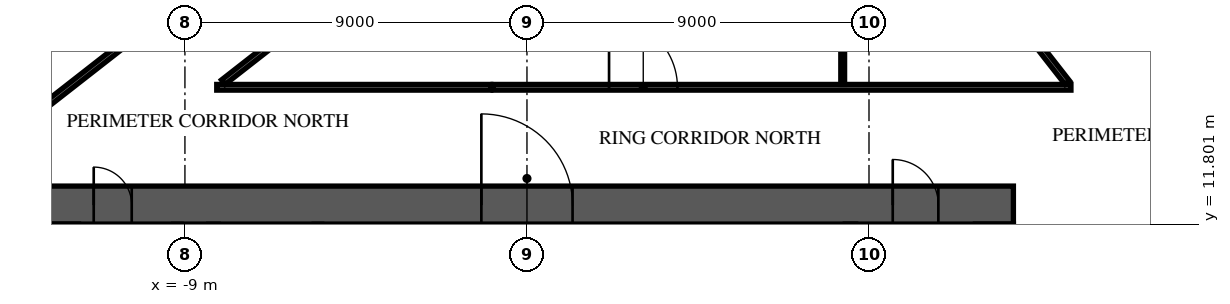
"""IFC4 building model, lengths in metres.
Left out: names, types, materials, properties, quantities, classifications, styles, units other than length and angle.
Written with IfcOpenShell. Run it as: python <this file> out.ifc"""

import sys

from ifc_helpers import new_model, si_unit, direction, frame, frame_2d, origin, place, context, subcontext, project, spatial, rectangle, extrude, element, fill, save


model = new_model("IFC4")
c1 = context("Model", 3, precision=1e-05, world=origin(), true_north=direction((0.0, 1.0)))
c2 = subcontext(c1, "Body", "Model", "MODEL_VIEW")
j1 = project(units=[si_unit("LENGTHUNIT", "METRE"), si_unit("PLANEANGLEUNIT", "RADIAN")], contexts=[c1])
p1 = place(None, origin())
s1 = spatial("IfcSite", under=j1, at=p1, CompositionType="ELEMENT")
p2 = place(p1, origin())
s2 = spatial("IfcBuilding", under=s1, at=p2, CompositionType="ELEMENT")
p3 = place(p2, frame((0.0, 0.0, 175.7)))
s3 = spatial("IfcBuildingStorey", under=s2, at=p3, CompositionType="ELEMENT", Elevation=175.7)
p4 = place(p3, frame((-12.8, 12.3, 0.0), z_axis=(0.0, 0.0, 1.0), x_axis=(1.0, 0.0, 0.0)))
e1 = element("IfcWall", 1, at=p4, inside=s3, PredefinedType="SHEAR", context=c2, shape_type="SweptSolid", body=[
    extrude(rectangle(XDim=25.6, YDim=1.0, at=frame_2d((12.8, 0.0))), origin(), (0.0, 0.0, 1.0), 3.6),
])
p5 = place(p4, frame((11.6, 0.0, 0.0)))
e2 = element("IfcOpeningElement", 2, at=p5, cuts=e1, PredefinedType="OPENING", context=c2, shape_type="SweptSolid", body=[
    extrude(rectangle(XDim=2.4, YDim=2.4, at=frame_2d((1.2, 1.2))), frame((0.0, 0.51, 0.0), z_axis=(0.0, -1.0, 0.0), x_axis=(1.0, 0.0, 0.0)), (0.0, 0.0, 1.0), 1.02),
])
p6 = place(p4, frame((22.425, 0.0, 0.0)))
e3 = element("IfcOpeningElement", 3, at=p6, cuts=e1, PredefinedType="OPENING", context=c2, shape_type="SweptSolid", body=[
    extrude(rectangle(XDim=1.2, YDim=2.1, at=frame_2d((0.6, 1.05))), frame((0.0, 0.51, 0.0), z_axis=(0.0, -1.0, 0.0), x_axis=(1.0, 0.0, 0.0)), (0.0, 0.0, 1.0), 1.02),
])
p7 = place(p4, frame((1.4, 0.0, 0.0)))
e4 = element("IfcOpeningElement", 4, at=p7, cuts=e1, PredefinedType="OPENING", context=c2, shape_type="SweptSolid", body=[
    extrude(rectangle(XDim=1.0, YDim=2.1, at=frame_2d((0.5, 1.05))), frame((0.0, 0.51, 0.0), z_axis=(0.0, -1.0, 0.0), x_axis=(1.0, 0.0, 0.0)), (0.0, 0.0, 1.0), 1.02),
])
p8 = place(p3, frame((3.238, 35.651, 0.0), z_axis=(0.0, 0.0, 1.0), x_axis=(-0.788009530914, -0.615663040298, 0.0)))
e5 = element("IfcWall", 5, at=p8, inside=s3, PredefinedType="STANDARD", context=c2, shape_type="SweptSolid", body=[
    extrude(rectangle(XDim=49.376, YDim=0.6, at=frame_2d((24.688, 0.0))), origin(), (0.0, 0.0, 1.0), 3.6),
])
p9 = place(p8, frame((1.2, 0.0, 0.9)))
e6 = element("IfcOpeningElement", 6, at=p9, cuts=e5, PredefinedType="OPENING", context=c2, shape_type="SweptSolid", body=[
    extrude(rectangle(XDim=2.1, YDim=2.1, at=frame_2d((1.05, 1.05))), frame((0.0, 0.31, 0.0), z_axis=(0.0, -1.0, 0.0), x_axis=(1.0, 0.0, 0.0)), (0.0, 0.0, 1.0), 0.62),
])
p10 = place(p8, frame((5.7, 0.0, 0.9)))
e7 = element("IfcOpeningElement", 7, at=p10, cuts=e5, PredefinedType="OPENING", context=c2, shape_type="SweptSolid", body=[
    extrude(rectangle(XDim=2.1, YDim=2.1, at=frame_2d((1.05, 1.05))), frame((0.0, 0.31, 0.0), z_axis=(0.0, -1.0, 0.0), x_axis=(1.0, 0.0, 0.0)), (0.0, 0.0, 1.0), 0.62),
])
p11 = place(p8, frame((10.2, 0.0, 0.9)))
e8 = element("IfcOpeningElement", 8, at=p11, cuts=e5, PredefinedType="OPENING", context=c2, shape_type="SweptSolid", body=[
    extrude(rectangle(XDim=2.1, YDim=2.1, at=frame_2d((1.05, 1.05))), frame((0.0, 0.31, 0.0), z_axis=(0.0, -1.0, 0.0), x_axis=(1.0, 0.0, 0.0)), (0.0, 0.0, 1.0), 0.62),
])
p12 = place(p8, frame((14.7, 0.0, 0.9)))
e9 = element("IfcOpeningElement", 9, at=p12, cuts=e5, PredefinedType="OPENING", context=c2, shape_type="SweptSolid", body=[
    extrude(rectangle(XDim=2.1, YDim=2.1, at=frame_2d((1.05, 1.05))), frame((0.0, 0.31, 0.0), z_axis=(0.0, -1.0, 0.0), x_axis=(1.0, 0.0, 0.0)), (0.0, 0.0, 1.0), 0.62),
])
p13 = place(p8, frame((19.2, 0.0, 0.9)))
e10 = element("IfcOpeningElement", 10, at=p13, cuts=e5, PredefinedType="OPENING", context=c2, shape_type="SweptSolid", body=[
    extrude(rectangle(XDim=2.1, YDim=2.1, at=frame_2d((1.05, 1.05))), frame((0.0, 0.31, 0.0), z_axis=(0.0, -1.0, 0.0), x_axis=(1.0, 0.0, 0.0)), (0.0, 0.0, 1.0), 0.62),
])
p14 = place(p8, frame((23.7, 0.0, 0.9)))
e11 = element("IfcOpeningElement", 11, at=p14, cuts=e5, PredefinedType="OPENING", context=c2, shape_type="SweptSolid", body=[
    extrude(rectangle(XDim=2.1, YDim=2.1, at=frame_2d((1.05, 1.05))), frame((0.0, 0.31, 0.0), z_axis=(0.0, -1.0, 0.0), x_axis=(1.0, 0.0, 0.0)), (0.0, 0.0, 1.0), 0.62),
])
p15 = place(p8, frame((28.2, 0.0, 0.9)))
e12 = element("IfcOpeningElement", 12, at=p15, cuts=e5, PredefinedType="OPENING", context=c2, shape_type="SweptSolid", body=[
    extrude(rectangle(XDim=2.1, YDim=2.1, at=frame_2d((1.05, 1.05))), frame((0.0, 0.31, 0.0), z_axis=(0.0, -1.0, 0.0), x_axis=(1.0, 0.0, 0.0)), (0.0, 0.0, 1.0), 0.62),
])
p16 = place(p8, frame((32.7, 0.0, 0.9)))
e13 = element("IfcOpeningElement", 13, at=p16, cuts=e5, PredefinedType="OPENING", context=c2, shape_type="SweptSolid", body=[
    extrude(rectangle(XDim=2.1, YDim=2.1, at=frame_2d((1.05, 1.05))), frame((0.0, 0.31, 0.0), z_axis=(0.0, -1.0, 0.0), x_axis=(1.0, 0.0, 0.0)), (0.0, 0.0, 1.0), 0.62),
])
p17 = place(p8, frame((37.2, 0.0, 0.9)))
e14 = element("IfcOpeningElement", 14, at=p17, cuts=e5, PredefinedType="OPENING", context=c2, shape_type="SweptSolid", body=[
    extrude(rectangle(XDim=2.1, YDim=2.1, at=frame_2d((1.05, 1.05))), frame((0.0, 0.31, 0.0), z_axis=(0.0, -1.0, 0.0), x_axis=(1.0, 0.0, 0.0)), (0.0, 0.0, 1.0), 0.62),
])
p18 = place(p8, frame((41.7, 0.0, 0.9)))
e15 = element("IfcOpeningElement", 15, at=p18, cuts=e5, PredefinedType="OPENING", context=c2, shape_type="SweptSolid", body=[
    extrude(rectangle(XDim=2.1, YDim=2.1, at=frame_2d((1.05, 1.05))), frame((0.0, 0.31, 0.0), z_axis=(0.0, -1.0, 0.0), x_axis=(1.0, 0.0, 0.0)), (0.0, 0.0, 1.0), 0.62),
])
p19 = place(p8, frame((46.138, 0.0, 0.9)))
e16 = element("IfcOpeningElement", 16, at=p19, cuts=e5, PredefinedType="OPENING", context=c2, shape_type="SweptSolid", body=[
    extrude(rectangle(XDim=2.1, YDim=2.1, at=frame_2d((1.05, 1.05))), frame((0.0, 0.31, 0.0), z_axis=(0.0, -1.0, 0.0), x_axis=(1.0, 0.0, 0.0)), (0.0, 0.0, 1.0), 0.62),
])
p20 = place(p3, frame((36.503, 1.52, 0.0), z_axis=(0.0, 0.0, 1.0), x_axis=(-0.615660779349, 0.788011297363, 0.0)))
e17 = element("IfcWall", 17, at=p20, inside=s3, PredefinedType="STANDARD", context=c2, shape_type="SweptSolid", body=[
    extrude(rectangle(XDim=42.176, YDim=0.6, at=frame_2d((21.088, 0.0))), origin(), (0.0, 0.0, 1.0), 3.6),
])
p21 = place(p20, frame((1.138, 0.0, 0.9)))
e18 = element("IfcOpeningElement", 18, at=p21, cuts=e17, PredefinedType="OPENING", context=c2, shape_type="SweptSolid", body=[
    extrude(rectangle(XDim=2.3, YDim=2.1, at=frame_2d((1.15, 1.05))), frame((0.0, 0.31, 0.0), z_axis=(0.0, -1.0, 0.0), x_axis=(1.0, 0.0, 0.0)), (0.0, 0.0, 1.0), 0.62),
])
p22 = place(p20, frame((5.776, 0.0, 0.9)))
e19 = element("IfcOpeningElement", 19, at=p22, cuts=e17, PredefinedType="OPENING", context=c2, shape_type="SweptSolid", body=[
    extrude(rectangle(XDim=2.3, YDim=2.1, at=frame_2d((1.15, 1.05))), frame((0.0, 0.31, 0.0), z_axis=(0.0, -1.0, 0.0), x_axis=(1.0, 0.0, 0.0)), (0.0, 0.0, 1.0), 0.62),
])
p23 = place(p20, frame((10.476, 0.0, 0.9)))
e20 = element("IfcOpeningElement", 20, at=p23, cuts=e17, PredefinedType="OPENING", context=c2, shape_type="SweptSolid", body=[
    extrude(rectangle(XDim=2.3, YDim=2.1, at=frame_2d((1.15, 1.05))), frame((0.0, 0.31, 0.0), z_axis=(0.0, -1.0, 0.0), x_axis=(1.0, 0.0, 0.0)), (0.0, 0.0, 1.0), 0.62),
])
p24 = place(p20, frame((15.176, 0.0, 0.9)))
e21 = element("IfcOpeningElement", 21, at=p24, cuts=e17, PredefinedType="OPENING", context=c2, shape_type="SweptSolid", body=[
    extrude(rectangle(XDim=2.3, YDim=2.1, at=frame_2d((1.15, 1.05))), frame((0.0, 0.31, 0.0), z_axis=(0.0, -1.0, 0.0), x_axis=(1.0, 0.0, 0.0)), (0.0, 0.0, 1.0), 0.62),
])
p25 = place(p20, frame((19.876, 0.0, 0.9)))
e22 = element("IfcOpeningElement", 22, at=p25, cuts=e17, PredefinedType="OPENING", context=c2, shape_type="SweptSolid", body=[
    extrude(rectangle(XDim=2.3, YDim=2.1, at=frame_2d((1.15, 1.05))), frame((0.0, 0.31, 0.0), z_axis=(0.0, -1.0, 0.0), x_axis=(1.0, 0.0, 0.0)), (0.0, 0.0, 1.0), 0.62),
])
p26 = place(p20, frame((24.576, 0.0, 0.9)))
e23 = element("IfcOpeningElement", 23, at=p26, cuts=e17, PredefinedType="OPENING", context=c2, shape_type="SweptSolid", body=[
    extrude(rectangle(XDim=2.3, YDim=2.1, at=frame_2d((1.15, 1.05))), frame((0.0, 0.31, 0.0), z_axis=(0.0, -1.0, 0.0), x_axis=(1.0, 0.0, 0.0)), (0.0, 0.0, 1.0), 0.62),
])
p27 = place(p20, frame((33.976, 0.0, 0.9)))
e24 = element("IfcOpeningElement", 24, at=p27, cuts=e17, PredefinedType="OPENING", context=c2, shape_type="SweptSolid", body=[
    extrude(rectangle(XDim=2.3, YDim=2.1, at=frame_2d((1.15, 1.05))), frame((0.0, 0.31, 0.0), z_axis=(0.0, -1.0, 0.0), x_axis=(1.0, 0.0, 0.0)), (0.0, 0.0, 1.0), 0.62),
])
p28 = place(p20, frame((38.676, 0.0, 0.9)))
e25 = element("IfcOpeningElement", 25, at=p28, cuts=e17, PredefinedType="OPENING", context=c2, shape_type="SweptSolid", body=[
    extrude(rectangle(XDim=2.3, YDim=2.1, at=frame_2d((1.15, 1.05))), frame((0.0, 0.31, 0.0), z_axis=(0.0, -1.0, 0.0), x_axis=(1.0, 0.0, 0.0)), (0.0, 0.0, 1.0), 0.62),
])
p29 = place(p3, frame((-24.433, 5.734, 0.0), z_axis=(0.0, 0.0, 1.0), x_axis=(0.788010131951, 0.615662271008, 0.0)))
e26 = element("IfcWall", 26, at=p29, inside=s3, PredefinedType="PARTITIONING", context=c2, shape_type="SweptSolid", body=[
    extrude(rectangle(XDim=31.448, YDim=0.15, at=frame_2d((15.724, 0.0))), origin(), (0.0, 0.0, 1.0), 3.15),
])
p30 = place(p29, frame((13.108, 0.0, 0.0)))
e27 = element("IfcOpeningElement", 27, at=p30, cuts=e26, PredefinedType="OPENING", context=c2, shape_type="SweptSolid", body=[
    extrude(rectangle(XDim=1.0, YDim=2.1, at=frame_2d((0.5, 1.05))), frame((0.0, 0.085, 0.0), z_axis=(0.0, -1.0, 0.0), x_axis=(1.0, 0.0, 0.0)), (0.0, 0.0, 1.0), 0.17),
])
p31 = place(p29, frame((23.227, 0.0, 0.0)))
e28 = element("IfcOpeningElement", 28, at=p31, cuts=e26, PredefinedType="OPENING", context=c2, shape_type="SweptSolid", body=[
    extrude(rectangle(XDim=1.0, YDim=2.1, at=frame_2d((0.5, 1.05))), frame((0.0, 0.085, 0.0), z_axis=(0.0, -1.0, 0.0), x_axis=(1.0, 0.0, 0.0)), (0.0, 0.0, 1.0), 0.17),
])
p32 = place(p3, frame((-8.163, 15.4, 0.0), z_axis=(0.0, 0.0, 1.0), x_axis=(1.0, 0.0, 0.0)))
e29 = element("IfcWall", 29, at=p32, inside=s3, PredefinedType="PARTITIONING", context=c2, shape_type="SweptSolid", body=[
    extrude(rectangle(XDim=7.211, YDim=0.15, at=frame_2d((3.605, 0.0))), origin(), (0.0, 0.0, 1.0), 3.15),
])
p33 = place(p3, frame((-7.991, 15.534, 0.0), z_axis=(0.0, 0.0, 1.0), x_axis=(0.788030651404, 0.615636006459, 0.0)))
e30 = element("IfcWall", 30, at=p33, inside=s3, PredefinedType="PARTITIONING", context=c2, shape_type="SweptSolid", body=[
    extrude(rectangle(XDim=12.382, YDim=0.15, at=frame_2d((6.191, 0.0))), origin(), (0.0, 0.0, 1.0), 3.15),
])
p34 = place(p3, frame((-0.89, 15.4, 0.0), z_axis=(0.0, 0.0, 1.0), x_axis=(1.0, 0.0, 0.0)))
e31 = element("IfcWall", 31, at=p34, inside=s3, PredefinedType="PARTITIONING", context=c2, shape_type="SweptSolid", body=[
    extrude(rectangle(XDim=15.204, YDim=0.15, at=frame_2d((7.602, 0.0))), origin(), (0.0, 0.0, 1.0), 3.15),
])
p35 = place(p34, frame((3.05, 0.0, 0.0)))
e32 = element("IfcOpeningElement", 32, at=p35, cuts=e31, PredefinedType="OPENING", context=c2, shape_type="SweptSolid", body=[
    extrude(rectangle(XDim=1.8, YDim=2.1, at=frame_2d((0.9, 1.05))), frame((0.0, 0.085, 0.0), z_axis=(0.0, -1.0, 0.0), x_axis=(1.0, 0.0, 0.0)), (0.0, 0.0, 1.0), 0.17),
])
p36 = place(p3, frame((7.822, 23.71, 0.0), z_axis=(0.0, 0.0, 1.0), x_axis=(0.615616229425, -0.788046101487, 0.0)))
e33 = element("IfcWall", 33, at=p36, inside=s3, PredefinedType="PARTITIONING", context=c2, shape_type="SweptSolid", body=[
    extrude(rectangle(XDim=10.391, YDim=0.15, at=frame_2d((5.196, 0.0))), origin(), (0.0, 0.0, 1.0), 3.15),
])
p37 = place(p36, frame((5.839, 0.0, 0.0)))
e34 = element("IfcOpeningElement", 34, at=p37, cuts=e33, PredefinedType="OPENING", context=c2, shape_type="SweptSolid", body=[
    extrude(rectangle(XDim=1.0, YDim=2.1, at=frame_2d((0.5, 1.05))), frame((0.0, 0.085, 0.0), z_axis=(0.0, -1.0, 0.0), x_axis=(1.0, 0.0, 0.0)), (0.0, 0.0, 1.0), 0.17),
])
p38 = place(p3, frame((9.713, 25.187, 0.0), z_axis=(0.0, 0.0, 1.0), x_axis=(0.615659714696, -0.788012129158, 0.0)))
e35 = element("IfcWall", 35, at=p38, inside=s3, PredefinedType="PARTITIONING", context=c2, shape_type="SweptSolid", body=[
    extrude(rectangle(XDim=27.811, YDim=0.15, at=frame_2d((13.905, 0.0))), origin(), (0.0, 0.0, 1.0), 3.15),
])
p39 = place(p38, frame((8.299, 0.0, 0.0)))
e36 = element("IfcOpeningElement", 36, at=p39, cuts=e35, PredefinedType="OPENING", context=c2, shape_type="SweptSolid", body=[
    extrude(rectangle(XDim=1.0, YDim=2.1, at=frame_2d((0.5, 1.05))), frame((0.0, 0.085, 0.0), z_axis=(0.0, -1.0, 0.0), x_axis=(1.0, 0.0, 0.0)), (0.0, 0.0, 1.0), 0.17),
])
p40 = place(p38, frame((15.951, 0.0, 0.0)))
e37 = element("IfcOpeningElement", 37, at=p40, cuts=e35, PredefinedType="OPENING", context=c2, shape_type="SweptSolid", body=[
    extrude(rectangle(XDim=1.0, YDim=2.1, at=frame_2d((0.5, 1.05))), frame((0.0, 0.085, 0.0), z_axis=(0.0, -1.0, 0.0), x_axis=(1.0, 0.0, 0.0)), (0.0, 0.0, 1.0), 0.17),
])
p41 = place(p3, frame((8.308, 15.475, 0.0), z_axis=(0.0, 0.0, 1.0), x_axis=(0.0, 1.0, 0.0)))
e38 = element("IfcWall", 38, at=p41, inside=s3, PredefinedType="PARTITIONING", context=c2, shape_type="SweptSolid", body=[
    extrude(rectangle(XDim=7.427, YDim=0.1, at=frame_2d((3.713, 0.0))), origin(), (0.0, 0.0, 1.0), 3.6),
])
p42 = place(p5, origin())
e39 = element("IfcDoor", 39, at=p42, inside=s3, OperationType="SINGLE_SWING_LEFT", PredefinedType="DOOR", context=c2, shape_type="SweptSolid", body=[
    extrude(rectangle(XDim=2.4, YDim=2.4, at=frame_2d((1.2, 1.2))), frame((0.0, 0.025, 0.0), z_axis=(0.0, -1.0, 0.0), x_axis=(1.0, 0.0, 0.0)), (0.0, 0.0, 1.0), 0.05),
])
fill(e2, e39)
p43 = place(p6, origin())
e40 = element("IfcDoor", 40, at=p43, inside=s3, OperationType="SINGLE_SWING_LEFT", PredefinedType="DOOR", context=c2, shape_type="SweptSolid", body=[
    extrude(rectangle(XDim=1.2, YDim=2.1, at=frame_2d((0.6, 1.05))), frame((0.0, 0.025, 0.0), z_axis=(0.0, -1.0, 0.0), x_axis=(1.0, 0.0, 0.0)), (0.0, 0.0, 1.0), 0.05),
])
fill(e3, e40)
p44 = place(p7, origin())
e41 = element("IfcDoor", 41, at=p44, inside=s3, OperationType="SINGLE_SWING_LEFT", PredefinedType="DOOR", context=c2, shape_type="SweptSolid", body=[
    extrude(rectangle(XDim=1.0, YDim=2.1, at=frame_2d((0.5, 1.05))), frame((0.0, 0.025, 0.0), z_axis=(0.0, -1.0, 0.0), x_axis=(1.0, 0.0, 0.0)), (0.0, 0.0, 1.0), 0.05),
])
fill(e4, e41)
p45 = place(p35, origin())
e42 = element("IfcDoor", 42, at=p45, inside=s3, OperationType="DOUBLE_DOOR_SINGLE_SWING", PredefinedType="DOOR", context=c2, shape_type="SweptSolid", body=[
    extrude(rectangle(XDim=1.8, YDim=2.1, at=frame_2d((0.9, 1.05))), frame((0.0, 0.025, 0.0), z_axis=(0.0, -1.0, 0.0), x_axis=(1.0, 0.0, 0.0)), (0.0, 0.0, 1.0), 0.05),
])
fill(e32, e42)
save(model, sys.argv[1])
